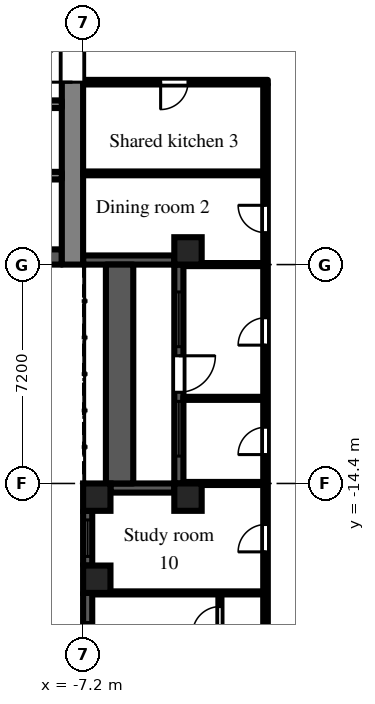
"""IFC4 building model, lengths in metres.
Left out: names, types, materials, properties, quantities, classifications, styles, units other than length and angle.
Written with IfcOpenShell. Run it as: python <this file> out.ifc"""

import sys

from ifc_helpers import new_model, si_unit, direction, frame, frame_2d, origin, origin_2d, place, context, subcontext, project, spatial, rectangle, extrude, element, fill, save


model = new_model("IFC4")
c1 = context("Model", 3, precision=1e-05, world=origin(), true_north=direction((0.0, 1.0)))
c2 = subcontext(c1, "Body", "Model", "MODEL_VIEW")
j1 = project(units=[si_unit("LENGTHUNIT", "METRE"), si_unit("PLANEANGLEUNIT", "RADIAN")], contexts=[c1])
p1 = place(None, origin())
s1 = spatial("IfcSite", under=j1, at=p1, CompositionType="ELEMENT")
p2 = place(p1, origin())
s2 = spatial("IfcBuilding", under=s1, at=p2, CompositionType="ELEMENT")
p3 = place(p2, frame((0.0, 0.0, 20.7)))
s3 = spatial("IfcBuildingStorey", under=s2, at=p3, CompositionType="ELEMENT", Elevation=20.7)
for number, where, z_axis, x_axis in (
    (1, (-6.75, -17.55, 0.0), (0.0, 0.0, 1.0), (1.0, 0.0, 0.0)),
    (2, (-6.75, -14.85, 0.0), (0.0, 0.0, 1.0), (1.0, 0.0, 0.0)),
    (3, (-3.75, -14.85, 0.0), (0.0, 0.0, 1.0), (1.0, 0.0, 0.0)),
    (4, (-3.75, -6.75, 0.0), (0.0, 0.0, 1.0), (1.0, 0.0, 0.0)),
):
    element("IfcColumn", number, at=place(p3, frame(where, z_axis=z_axis, x_axis=x_axis)), inside=s3, PredefinedType="COLUMN", context=c2, shape_type="SweptSolid", body=[
        extrude(rectangle(XDim=0.9, YDim=0.9, at=origin_2d()), origin(), (0.0, 0.0, 1.0), 3.0),
    ])
p4 = place(p3, frame((-7.2, -7.05, 0.0), z_axis=(0.0, 0.0, 1.0), x_axis=(1.0, 0.0, 0.0)))
e5 = element("IfcWall", 5, at=p4, inside=s3, PredefinedType="SOLIDWALL", context=c2, shape_type="SweptSolid", body=[
    extrude(rectangle(XDim=3.0, YDim=0.3, at=frame_2d((1.5, 0.0))), origin(), (0.0, 0.0, 1.0), 2.1),
])
p5 = place(p3, frame((-4.05, -7.2, 0.0), z_axis=(0.0, 0.0, 1.0), x_axis=(0.0, -1.0, 0.0)))
e6 = element("IfcWall", 6, at=p5, inside=s3, PredefinedType="SOLIDWALL", context=c2, shape_type="SweptSolid", body=[
    extrude(rectangle(XDim=7.2, YDim=0.3, at=frame_2d((3.6, 0.0))), origin(), (0.0, 0.0, 1.0), 2.1),
])
p6 = place(p5, frame((3.0, 0.0, 0.0)))
e7 = element("IfcOpeningElement", 7, at=p6, cuts=e6, PredefinedType="OPENING", context=c2, shape_type="SweptSolid", body=[
    extrude(rectangle(XDim=1.2, YDim=2.05, at=frame_2d((0.6, 1.025))), frame((0.0, 0.16, 0.0), z_axis=(0.0, -1.0, 0.0), x_axis=(1.0, 0.0, 0.0)), (0.0, 0.0, 1.0), 0.32),
])
p7 = place(p5, frame((0.9, 0.0, 0.2)))
e8 = element("IfcOpeningElement", 8, at=p7, cuts=e6, PredefinedType="OPENING", context=c2, shape_type="SweptSolid", body=[
    extrude(rectangle(XDim=1.8, YDim=1.85, at=frame_2d((0.9, 0.925))), frame((0.0, 0.16, 0.0), z_axis=(0.0, -1.0, 0.0), x_axis=(1.0, 0.0, 0.0)), (0.0, 0.0, 1.0), 0.32),
])
p8 = place(p5, frame((4.5, 0.0, 0.2)))
e9 = element("IfcOpeningElement", 9, at=p8, cuts=e6, PredefinedType="OPENING", context=c2, shape_type="SweptSolid", body=[
    extrude(rectangle(XDim=1.8, YDim=1.85, at=frame_2d((0.9, 0.925))), frame((0.0, 0.16, 0.0), z_axis=(0.0, -1.0, 0.0), x_axis=(1.0, 0.0, 0.0)), (0.0, 0.0, 1.0), 0.32),
])
p9 = place(p3, frame((-4.2, -14.55, 0.0), z_axis=(0.0, 0.0, 1.0), x_axis=(-1.0, 0.0, 0.0)))
e10 = element("IfcWall", 10, at=p9, inside=s3, PredefinedType="SOLIDWALL", context=c2, shape_type="SweptSolid", body=[
    extrude(rectangle(XDim=2.1, YDim=0.3, at=frame_2d((1.05, 0.0))), origin(), (0.0, 0.0, 1.0), 2.1),
])
p10 = place(p3, frame((-7.05, -15.3, 0.0), z_axis=(0.0, 0.0, 1.0), x_axis=(0.0, -1.0, 0.0)))
e11 = element("IfcWall", 11, at=p10, inside=s3, PredefinedType="SOLIDWALL", context=c2, shape_type="SweptSolid", body=[
    extrude(rectangle(XDim=1.8, YDim=0.3, at=frame_2d((0.9, 0.0))), origin(), (0.0, 0.0, 1.0), 2.1),
])
p11 = place(p10, frame((0.3, 0.0, 0.2)))
e12 = element("IfcOpeningElement", 12, at=p11, cuts=e11, PredefinedType="OPENING", context=c2, shape_type="SweptSolid", body=[
    extrude(rectangle(XDim=1.2, YDim=1.85, at=frame_2d((0.6, 0.925))), frame((0.0, 0.16, 0.0), z_axis=(0.0, -1.0, 0.0), x_axis=(1.0, 0.0, 0.0)), (0.0, 0.0, 1.0), 0.32),
])
p12 = place(p3, frame((-7.05, -18.0, 0.0), z_axis=(0.0, 0.0, 1.0), x_axis=(0.0, -1.0, 0.0)))
e13 = element("IfcWall", 13, at=p12, inside=s3, PredefinedType="SOLIDWALL", context=c2, shape_type="SweptSolid", body=[
    extrude(rectangle(XDim=3.15, YDim=0.3, at=frame_2d((1.575, 0.0))), origin(), (0.0, 0.0, 1.0), 2.1),
])
p13 = place(p12, frame((0.975, 0.0, 0.2)))
e14 = element("IfcOpeningElement", 14, at=p13, cuts=e13, PredefinedType="OPENING", context=c2, shape_type="SweptSolid", body=[
    extrude(rectangle(XDim=1.2, YDim=1.85, at=frame_2d((0.6, 0.925))), frame((0.0, 0.16, 0.0), z_axis=(0.0, -1.0, 0.0), x_axis=(1.0, 0.0, 0.0)), (0.0, 0.0, 1.0), 0.32),
])
p14 = place(p3, frame((-6.0, -14.4, 0.0), z_axis=(0.0, 0.0, 1.0), x_axis=(0.0, 1.0, 0.0)))
e15 = element("IfcWall", 15, at=p14, inside=s3, PredefinedType="PARAPET", context=c2, shape_type="SweptSolid", body=[
    extrude(rectangle(XDim=7.2, YDim=0.9, at=frame_2d((3.6, 0.0))), origin(), (0.0, 0.0, 1.0), 0.8),
])
p15 = place(p3, frame((-7.55, -7.2, 0.0), z_axis=(0.0, 0.0, 1.0), x_axis=(0.0, 1.0, 0.0)))
e16 = element("IfcWall", 16, at=p15, inside=s3, PredefinedType="SHEAR", context=c2, shape_type="SweptSolid", body=[
    extrude(rectangle(XDim=14.4, YDim=0.7, at=frame_2d((7.2, 0.0))), origin(), (0.0, 0.0, 1.0), 2.575),
])
p16 = place(p15, frame((6.0, 0.0, 0.0)))
e17 = element("IfcOpeningElement", 17, at=p16, cuts=e16, PredefinedType="OPENING", context=c2, shape_type="SweptSolid", body=[
    extrude(rectangle(XDim=2.4, YDim=2.2, at=frame_2d((1.2, 1.1))), frame((0.0, 0.36, 0.0), z_axis=(0.0, -1.0, 0.0), x_axis=(1.0, 0.0, 0.0)), (0.0, 0.0, 1.0), 0.72),
])
p17 = place(p3, frame((-7.9, -6.95, 0.0), z_axis=(0.0, 0.0, 1.0), x_axis=(-1.0, 0.0, 0.0)))
e18 = element("IfcWall", 18, at=p17, inside=s3, PredefinedType="SHEAR", context=c2, shape_type="SweptSolid", body=[
    extrude(rectangle(XDim=12.95, YDim=0.5, at=frame_2d((6.475, 0.0))), origin(), (0.0, 0.0, 1.0), 2.575),
])
p18 = place(p3, frame((-7.9, -1.925, 0.0), z_axis=(0.0, 0.0, 1.0), x_axis=(-1.0, 0.0, 0.0)))
e19 = element("IfcWall", 19, at=p18, inside=s3, PredefinedType="SHEAR", context=c2, shape_type="SweptSolid", body=[
    extrude(rectangle(XDim=12.95, YDim=0.25, at=frame_2d((6.475, 0.0))), origin(), (0.0, 0.0, 1.0), 2.575),
])
p19 = place(p18, frame((4.825, 0.0, 0.0)))
e20 = element("IfcOpeningElement", 20, at=p19, cuts=e19, PredefinedType="OPENING", context=c2, shape_type="SweptSolid", body=[
    extrude(rectangle(XDim=1.1, YDim=2.1, at=frame_2d((0.55, 1.05))), frame((0.0, 0.135, 0.0), z_axis=(0.0, -1.0, 0.0), x_axis=(1.0, 0.0, 0.0)), (0.0, 0.0, 1.0), 0.27),
])
p20 = place(p18, frame((7.025, 0.0, 0.0)))
e21 = element("IfcOpeningElement", 21, at=p20, cuts=e19, PredefinedType="OPENING", context=c2, shape_type="SweptSolid", body=[
    extrude(rectangle(XDim=1.1, YDim=2.1, at=frame_2d((0.55, 1.05))), frame((0.0, 0.135, 0.0), z_axis=(0.0, -1.0, 0.0), x_axis=(1.0, 0.0, 0.0)), (0.0, 0.0, 1.0), 0.27),
])
p21 = place(p18, frame((9.225, 0.0, 0.0)))
e22 = element("IfcOpeningElement", 22, at=p21, cuts=e19, PredefinedType="OPENING", context=c2, shape_type="SweptSolid", body=[
    extrude(rectangle(XDim=1.1, YDim=2.1, at=frame_2d((0.55, 1.05))), frame((0.0, 0.135, 0.0), z_axis=(0.0, -1.0, 0.0), x_axis=(1.0, 0.0, 0.0)), (0.0, 0.0, 1.0), 0.27),
])
p22 = place(p18, frame((0.525, 0.0, 0.0)))
e23 = element("IfcOpeningElement", 23, at=p22, cuts=e19, PredefinedType="OPENING", context=c2, shape_type="SweptSolid", body=[
    extrude(rectangle(XDim=0.9, YDim=2.1, at=frame_2d((0.45, 1.05))), frame((0.0, 0.135, 0.0), z_axis=(0.0, -1.0, 0.0), x_axis=(1.0, 0.0, 0.0)), (0.0, 0.0, 1.0), 0.27),
])
p23 = place(p18, frame((2.625, 0.0, 0.0)))
e24 = element("IfcOpeningElement", 24, at=p23, cuts=e19, PredefinedType="OPENING", context=c2, shape_type="SweptSolid", body=[
    extrude(rectangle(XDim=1.1, YDim=2.1, at=frame_2d((0.55, 1.05))), frame((0.0, 0.135, 0.0), z_axis=(0.0, -1.0, 0.0), x_axis=(1.0, 0.0, 0.0)), (0.0, 0.0, 1.0), 0.27),
])
p24 = place(p3, frame((-7.9, -4.275, 0.0), z_axis=(0.0, 0.0, 1.0), x_axis=(-1.0, 0.0, 0.0)))
e25 = element("IfcWall", 25, at=p24, inside=s3, PredefinedType="SHEAR", context=c2, shape_type="SweptSolid", body=[
    extrude(rectangle(XDim=1.95, YDim=0.25, at=frame_2d((0.975, 0.0))), origin(), (0.0, 0.0, 1.0), 2.575),
])
p25 = place(p3, frame((-7.2, -4.2, 0.0), z_axis=(0.0, 0.0, 1.0), x_axis=(1.0, 0.0, 0.0)))
e26 = element("IfcWall", 26, at=p25, inside=s3, PredefinedType="PARTITIONING", context=c2, shape_type="SweptSolid", body=[
    extrude(rectangle(XDim=5.925, YDim=0.125, at=frame_2d((2.962, 0.0))), origin(), (0.0, 0.0, 1.0), 2.575),
])
p26 = place(p3, frame((-7.2, -1.2, 0.0), z_axis=(0.0, 0.0, 1.0), x_axis=(1.0, 0.0, 0.0)))
e27 = element("IfcWall", 27, at=p26, inside=s3, PredefinedType="PARTITIONING", context=c2, shape_type="SweptSolid", body=[
    extrude(rectangle(XDim=6.075, YDim=0.15, at=frame_2d((3.038, 0.0))), origin(), (0.0, 0.0, 1.0), 2.575),
])
p27 = place(p26, frame((2.55, 0.0, 0.0)))
e28 = element("IfcOpeningElement", 28, at=p27, cuts=e27, PredefinedType="OPENING", context=c2, shape_type="SweptSolid", body=[
    extrude(rectangle(XDim=0.9, YDim=2.1, at=frame_2d((0.45, 1.05))), frame((0.0, 0.085, 0.0), z_axis=(0.0, -1.0, 0.0), x_axis=(1.0, 0.0, 0.0)), (0.0, 0.0, 1.0), 0.17),
])
p28 = place(p3, frame((-6.9, -18.0, 0.0), z_axis=(0.0, 0.0, 1.0), x_axis=(1.0, 0.0, 0.0)))
e29 = element("IfcWall", 29, at=p28, inside=s3, PredefinedType="PARTITIONING", context=c2, shape_type="SweptSolid", body=[
    extrude(rectangle(XDim=5.625, YDim=0.1, at=frame_2d((2.812, 0.0))), origin(), (0.0, 0.0, 1.0), 2.575),
])
for number, where, z_axis, x_axis in (
    (30, (-3.9, -14.4, 0.0), (0.0, 0.0, 1.0), (1.0, 0.0, 0.0)),
    (31, (-3.9, -11.6, 0.0), (0.0, 0.0, 1.0), (1.0, 0.0, 0.0)),
    (32, (-3.9, -7.2, 0.0), (0.0, 0.0, 1.0), (1.0, 0.0, 0.0)),
):
    element("IfcWall", number, at=place(p3, frame(where, z_axis=z_axis, x_axis=x_axis)), inside=s3, PredefinedType="PARTITIONING", context=c2, shape_type="SweptSolid", body=[
        extrude(rectangle(XDim=2.625, YDim=0.1, at=frame_2d((1.312, 0.0))), origin(), (0.0, 0.0, 1.0), 2.575),
    ])
p29 = place(p3, frame((-2.7, -32.35, 0.0), z_axis=(0.0, 0.0, 1.0), x_axis=(0.0, 1.0, 0.0)))
e33 = element("IfcWall", 33, at=p29, inside=s3, PredefinedType="PARTITIONING", context=c2, shape_type="SweptSolid", body=[
    extrude(rectangle(XDim=14.3, YDim=0.1, at=frame_2d((7.15, 0.0))), origin(), (0.0, 0.0, 1.0), 2.575),
])
p30 = place(p29, frame((0.4, 0.0, 0.0)))
e34 = element("IfcOpeningElement", 34, at=p30, cuts=e33, PredefinedType="OPENING", context=c2, shape_type="SweptSolid", body=[
    extrude(rectangle(XDim=0.9, YDim=2.1, at=frame_2d((0.45, 1.05))), frame((0.0, 0.06, 0.0), z_axis=(0.0, -1.0, 0.0), x_axis=(1.0, 0.0, 0.0)), (0.0, 0.0, 1.0), 0.12),
])
p31 = place(p29, frame((5.8, 0.0, 0.0)))
e35 = element("IfcOpeningElement", 35, at=p31, cuts=e33, PredefinedType="OPENING", context=c2, shape_type="SweptSolid", body=[
    extrude(rectangle(XDim=0.9, YDim=2.1, at=frame_2d((0.45, 1.05))), frame((0.0, 0.06, 0.0), z_axis=(0.0, -1.0, 0.0), x_axis=(1.0, 0.0, 0.0)), (0.0, 0.0, 1.0), 0.12),
])
p32 = place(p29, frame((7.6, 0.0, 0.0)))
e36 = element("IfcOpeningElement", 36, at=p32, cuts=e33, PredefinedType="OPENING", context=c2, shape_type="SweptSolid", body=[
    extrude(rectangle(XDim=0.9, YDim=2.1, at=frame_2d((0.45, 1.05))), frame((0.0, 0.06, 0.0), z_axis=(0.0, -1.0, 0.0), x_axis=(1.0, 0.0, 0.0)), (0.0, 0.0, 1.0), 0.12),
])
p33 = place(p29, frame((13.0, 0.0, 0.0)))
e37 = element("IfcOpeningElement", 37, at=p33, cuts=e33, PredefinedType="OPENING", context=c2, shape_type="SweptSolid", body=[
    extrude(rectangle(XDim=0.9, YDim=2.1, at=frame_2d((0.45, 1.05))), frame((0.0, 0.06, 0.0), z_axis=(0.0, -1.0, 0.0), x_axis=(1.0, 0.0, 0.0)), (0.0, 0.0, 1.0), 0.12),
])
p34 = place(p3, frame((-1.2, -36.5, 0.0), z_axis=(0.0, 0.0, 1.0), x_axis=(0.0, 1.0, 0.0)))
e38 = element("IfcWall", 38, at=p34, inside=s3, PredefinedType="PARTITIONING", context=c2, shape_type="SweptSolid", body=[
    extrude(rectangle(XDim=35.225, YDim=0.15, at=frame_2d((17.613, 0.0))), origin(), (0.0, 0.0, 1.0), 2.575),
])
p35 = place(p34, frame((30.35, 0.0, 0.0)))
e39 = element("IfcOpeningElement", 39, at=p35, cuts=e38, PredefinedType="OPENING", context=c2, shape_type="SweptSolid", body=[
    extrude(rectangle(XDim=0.9, YDim=2.1, at=frame_2d((0.45, 1.05))), frame((0.0, 0.085, 0.0), z_axis=(0.0, -1.0, 0.0), x_axis=(1.0, 0.0, 0.0)), (0.0, 0.0, 1.0), 0.17),
])
p36 = place(p34, frame((23.05, 0.0, 0.0)))
e40 = element("IfcOpeningElement", 40, at=p36, cuts=e38, PredefinedType="OPENING", context=c2, shape_type="SweptSolid", body=[
    extrude(rectangle(XDim=0.9, YDim=2.1, at=frame_2d((0.45, 1.05))), frame((0.0, 0.085, 0.0), z_axis=(0.0, -1.0, 0.0), x_axis=(1.0, 0.0, 0.0)), (0.0, 0.0, 1.0), 0.17),
])
p37 = place(p34, frame((26.65, 0.0, 0.0)))
e41 = element("IfcOpeningElement", 41, at=p37, cuts=e38, PredefinedType="OPENING", context=c2, shape_type="SweptSolid", body=[
    extrude(rectangle(XDim=0.9, YDim=2.1, at=frame_2d((0.45, 1.05))), frame((0.0, 0.085, 0.0), z_axis=(0.0, -1.0, 0.0), x_axis=(1.0, 0.0, 0.0)), (0.0, 0.0, 1.0), 0.17),
])
p38 = place(p34, frame((19.85, 0.0, 0.0)))
e42 = element("IfcOpeningElement", 42, at=p38, cuts=e38, PredefinedType="OPENING", context=c2, shape_type="SweptSolid", body=[
    extrude(rectangle(XDim=0.9, YDim=2.1, at=frame_2d((0.45, 1.05))), frame((0.0, 0.085, 0.0), z_axis=(0.0, -1.0, 0.0), x_axis=(1.0, 0.0, 0.0)), (0.0, 0.0, 1.0), 0.17),
])
p39 = place(p34, frame((1.55, 0.0, 0.0)))
e43 = element("IfcOpeningElement", 43, at=p39, cuts=e38, PredefinedType="OPENING", context=c2, shape_type="SweptSolid", body=[
    extrude(rectangle(XDim=1.0, YDim=2.1, at=frame_2d((0.5, 1.05))), frame((0.0, 0.085, 0.0), z_axis=(0.0, -1.0, 0.0), x_axis=(1.0, 0.0, 0.0)), (0.0, 0.0, 1.0), 0.17),
])
p40 = place(p6, origin())
e44 = element("IfcDoor", 44, at=p40, inside=s3, OperationType="SINGLE_SWING_LEFT", PredefinedType="DOOR", context=c2, shape_type="SweptSolid", body=[
    extrude(rectangle(XDim=1.2, YDim=2.05, at=frame_2d((0.6, 1.025))), frame((0.0, 0.025, 0.0), z_axis=(0.0, -1.0, 0.0), x_axis=(1.0, 0.0, 0.0)), (0.0, 0.0, 1.0), 0.05),
])
fill(e7, e44)
p41 = place(p7, origin())
e45 = element("IfcWindow", 45, at=p41, inside=s3, PartitioningType="SINGLE_PANEL", PredefinedType="WINDOW", context=c2, shape_type="SweptSolid", body=[
    extrude(rectangle(XDim=1.8, YDim=1.85, at=frame_2d((0.9, 0.925))), frame((0.0, 0.03, 0.0), z_axis=(0.0, -1.0, 0.0), x_axis=(1.0, 0.0, 0.0)), (0.0, 0.0, 1.0), 0.06),
])
fill(e8, e45)
p42 = place(p8, origin())
e46 = element("IfcWindow", 46, at=p42, inside=s3, PartitioningType="SINGLE_PANEL", PredefinedType="WINDOW", context=c2, shape_type="SweptSolid", body=[
    extrude(rectangle(XDim=1.8, YDim=1.85, at=frame_2d((0.9, 0.925))), frame((0.0, 0.03, 0.0), z_axis=(0.0, -1.0, 0.0), x_axis=(1.0, 0.0, 0.0)), (0.0, 0.0, 1.0), 0.06),
])
fill(e9, e46)
p43 = place(p11, origin())
e47 = element("IfcWindow", 47, at=p43, inside=s3, PartitioningType="SINGLE_PANEL", PredefinedType="WINDOW", context=c2, shape_type="SweptSolid", body=[
    extrude(rectangle(XDim=1.2, YDim=1.85, at=frame_2d((0.6, 0.925))), frame((0.0, 0.03, 0.0), z_axis=(0.0, -1.0, 0.0), x_axis=(1.0, 0.0, 0.0)), (0.0, 0.0, 1.0), 0.06),
])
fill(e12, e47)
p44 = place(p13, origin())
e48 = element("IfcWindow", 48, at=p44, inside=s3, PartitioningType="SINGLE_PANEL", PredefinedType="WINDOW", context=c2, shape_type="SweptSolid", body=[
    extrude(rectangle(XDim=1.2, YDim=1.85, at=frame_2d((0.6, 0.925))), frame((0.0, 0.03, 0.0), z_axis=(0.0, -1.0, 0.0), x_axis=(1.0, 0.0, 0.0)), (0.0, 0.0, 1.0), 0.06),
])
fill(e14, e48)
p45 = place(p16, origin())
e49 = element("IfcDoor", 49, at=p45, inside=s3, OperationType="DOUBLE_DOOR_DOUBLE_SWING", PredefinedType="DOOR", context=c2, shape_type="SweptSolid", body=[
    extrude(rectangle(XDim=2.4, YDim=2.2, at=frame_2d((1.2, 1.1))), frame((0.0, 0.025, 0.0), z_axis=(0.0, -1.0, 0.0), x_axis=(1.0, 0.0, 0.0)), (0.0, 0.0, 1.0), 0.05),
])
fill(e17, e49)
p46 = place(p27, frame((0.9, 0.0, 0.0), z_axis=(0.0, 0.0, 1.0), x_axis=(-1.0, 0.0, 0.0)))
e50 = element("IfcDoor", 50, at=p46, inside=s3, OperationType="SINGLE_SWING_RIGHT", PredefinedType="DOOR", context=c2, shape_type="SweptSolid", body=[
    extrude(rectangle(XDim=0.9, YDim=2.1, at=frame_2d((0.45, 1.05))), frame((0.0, 0.025, 0.0), z_axis=(0.0, -1.0, 0.0), x_axis=(1.0, 0.0, 0.0)), (0.0, 0.0, 1.0), 0.05),
])
fill(e28, e50)
p47 = place(p35, origin())
e51 = element("IfcDoor", 51, at=p47, inside=s3, OperationType="SINGLE_SWING_RIGHT", PredefinedType="DOOR", context=c2, shape_type="SweptSolid", body=[
    extrude(rectangle(XDim=0.9, YDim=2.1, at=frame_2d((0.45, 1.05))), frame((0.0, 0.025, 0.0), z_axis=(0.0, -1.0, 0.0), x_axis=(1.0, 0.0, 0.0)), (0.0, 0.0, 1.0), 0.05),
])
fill(e39, e51)
p48 = place(p36, origin())
e52 = element("IfcDoor", 52, at=p48, inside=s3, OperationType="SINGLE_SWING_LEFT", PredefinedType="DOOR", context=c2, shape_type="SweptSolid", body=[
    extrude(rectangle(XDim=0.9, YDim=2.1, at=frame_2d((0.45, 1.05))), frame((0.0, 0.025, 0.0), z_axis=(0.0, -1.0, 0.0), x_axis=(1.0, 0.0, 0.0)), (0.0, 0.0, 1.0), 0.05),
])
fill(e40, e52)
p49 = place(p37, origin())
e53 = element("IfcDoor", 53, at=p49, inside=s3, OperationType="SINGLE_SWING_LEFT", PredefinedType="DOOR", context=c2, shape_type="SweptSolid", body=[
    extrude(rectangle(XDim=0.9, YDim=2.1, at=frame_2d((0.45, 1.05))), frame((0.0, 0.025, 0.0), z_axis=(0.0, -1.0, 0.0), x_axis=(1.0, 0.0, 0.0)), (0.0, 0.0, 1.0), 0.05),
])
fill(e41, e53)
p50 = place(p38, origin())
e54 = element("IfcDoor", 54, at=p50, inside=s3, OperationType="SINGLE_SWING_LEFT", PredefinedType="DOOR", context=c2, shape_type="SweptSolid", body=[
    extrude(rectangle(XDim=0.9, YDim=2.1, at=frame_2d((0.45, 1.05))), frame((0.0, 0.025, 0.0), z_axis=(0.0, -1.0, 0.0), x_axis=(1.0, 0.0, 0.0)), (0.0, 0.0, 1.0), 0.05),
])
fill(e42, e54)
p51 = place(p33, origin())
e55 = element("IfcDoor", 55, at=p51, inside=s3, OperationType="SINGLE_SWING_LEFT", PredefinedType="DOOR", context=c2, shape_type="SweptSolid", body=[
    extrude(rectangle(XDim=0.9, YDim=2.1, at=frame_2d((0.45, 1.05))), frame((0.0, 0.025, 0.0), z_axis=(0.0, -1.0, 0.0), x_axis=(1.0, 0.0, 0.0)), (0.0, 0.0, 1.0), 0.05),
])
fill(e37, e55)
save(model, sys.argv[1])
